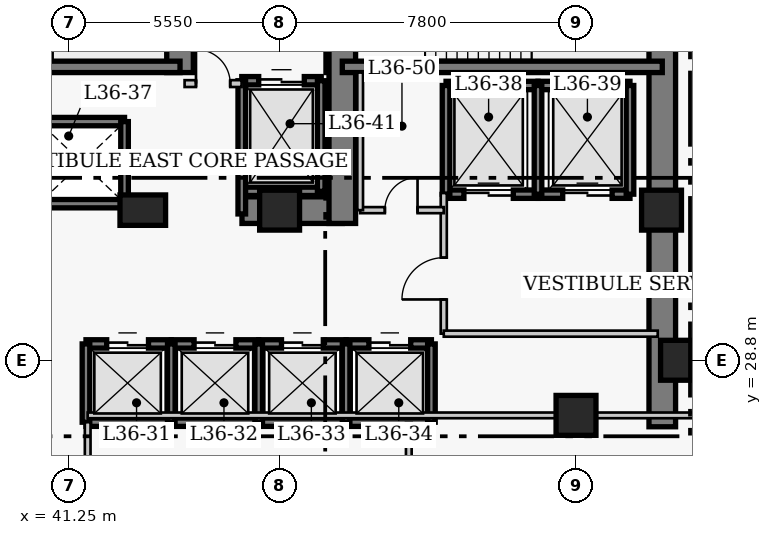
"""IFC4 building model, lengths in metres.
Left out: names, types, materials, properties, quantities, classifications, styles, units other than length and angle.
Written with IfcOpenShell. Run it as: python <this file> out.ifc"""

import sys

from ifc_helpers import new_model, si_unit, direction, frame, frame_2d, origin, origin_2d, place, context, subcontext, project, spatial, rectangle, extrude, element, fill, save


model = new_model("IFC4")
c1 = context("Model", 3, precision=1e-05, world=origin(), true_north=direction((0.0, 1.0)))
c2 = subcontext(c1, "Body", "Model", "MODEL_VIEW")
j1 = project(units=[si_unit("LENGTHUNIT", "METRE"), si_unit("PLANEANGLEUNIT", "RADIAN")], contexts=[c1])
p1 = place(None, origin())
s1 = spatial("IfcSite", under=j1, at=p1, CompositionType="ELEMENT")
p2 = place(p1, origin())
s2 = spatial("IfcBuilding", under=s1, at=p2, CompositionType="ELEMENT")
p3 = place(p2, frame((0.0, 0.0, 146.0)))
s3 = spatial("IfcBuildingStorey", under=s2, at=p3, CompositionType="ELEMENT", Elevation=146.0)
p4 = place(p3, frame((56.87, 27.05, 0.0), z_axis=(0.0, 0.0, 1.0), x_axis=(0.0, 1.0, 0.0)))
e1 = element("IfcWall", 1, at=p4, inside=s3, PredefinedType="SHEAR", context=c2, shape_type="SweptSolid", body=[
    extrude(rectangle(XDim=13.62, YDim=0.7, at=frame_2d((6.81, 0.0))), origin(), (0.0, 0.0, 1.0), 3.8),
])
p5 = place(p3, frame((45.81, 32.75, 0.0), z_axis=(0.0, 0.0, 1.0), x_axis=(1.0, 0.0, 0.0)))
e2 = element("IfcWall", 2, at=p5, inside=s3, PredefinedType="SHEAR", context=c2, shape_type="SweptSolid", body=[
    extrude(rectangle(XDim=2.64, YDim=0.7, at=frame_2d((1.32, 0.0))), origin(), (0.0, 0.0, 1.0), 3.8),
])
p6 = place(p3, frame((44.18, 36.37, 0.0), z_axis=(0.0, 0.0, 1.0), x_axis=(0.0, 1.0, 0.0)))
e3 = element("IfcWall", 3, at=p6, inside=s3, PredefinedType="SHEAR", context=c2, shape_type="SweptSolid", body=[
    extrude(rectangle(XDim=3.95, YDim=0.7, at=frame_2d((1.975, 0.0))), origin(), (0.0, 0.0, 1.0), 3.8),
])
p7 = place(p3, frame((48.45, 32.4, 0.0), z_axis=(0.0, 0.0, 1.0), x_axis=(0.0, 1.0, 0.0)))
e4 = element("IfcWall", 4, at=p7, inside=s3, PredefinedType="SHEAR", context=c2, shape_type="SweptSolid", body=[
    extrude(rectangle(XDim=7.92, YDim=0.7, at=frame_2d((3.96, 0.0))), origin(), (0.0, 0.0, 1.0), 3.8),
])
p8 = place(p7, frame((5.8, 0.0, 0.0)))
e5 = element("IfcOpeningElement", 5, at=p8, cuts=e4, PredefinedType="OPENING", context=c2, shape_type="SweptSolid", body=[
    extrude(rectangle(XDim=1.1, YDim=2.15, at=frame_2d((0.55, 1.075))), frame((0.0, 0.36, 0.0), z_axis=(0.0, -1.0, 0.0), x_axis=(1.0, 0.0, 0.0)), (0.0, 0.0, 1.0), 0.72),
])
p9 = place(p3, frame((35.85, 36.52, 0.0), z_axis=(0.0, 0.0, 1.0), x_axis=(1.0, 0.0, 0.0)))
e6 = element("IfcWall", 6, at=p9, inside=s3, PredefinedType="SHEAR", context=c2, shape_type="SweptSolid", body=[
    extrude(rectangle(XDim=8.33, YDim=0.3, at=frame_2d((4.165, 0.0))), origin(), (0.0, 0.0, 1.0), 3.8),
])
p10 = place(p3, frame((48.45, 36.52, 0.0), z_axis=(0.0, 0.0, 1.0), x_axis=(1.0, 0.0, 0.0)))
e7 = element("IfcWall", 7, at=p10, inside=s3, PredefinedType="SHEAR", context=c2, shape_type="SweptSolid", body=[
    extrude(rectangle(XDim=8.42, YDim=0.3, at=frame_2d((4.21, 0.0))), origin(), (0.0, 0.0, 1.0), 3.8),
])
p11 = place(p3, frame((57.35, 28.8, 0.0), z_axis=(0.0, 0.0, 1.0), x_axis=(1.0, 0.0, 0.0)))
e8 = element("IfcColumn", 8, at=p11, inside=s3, PredefinedType="COLUMN", context=c2, shape_type="SweptSolid", body=[
    extrude(rectangle(XDim=1.05, YDim=1.05, at=origin_2d()), origin(), (0.0, 0.0, 1.0), 3.8),
])
p12 = place(p3, frame((43.2, 32.75, 0.0), z_axis=(0.0, 0.0, 1.0), x_axis=(1.0, 0.0, 0.0)))
e9 = element("IfcColumn", 9, at=p12, inside=s3, PredefinedType="COLUMN", context=c2, shape_type="SweptSolid", body=[
    extrude(rectangle(XDim=1.2, YDim=0.8, at=origin_2d()), origin(), (0.0, 0.0, 1.0), 3.8),
])
for number, where, z_axis, x_axis in (
    (10, (46.8, 32.75, 0.0), (0.0, 0.0, 1.0), (1.0, 0.0, 0.0)),
    (11, (54.6, 27.35, 0.0), (0.0, 0.0, 1.0), (1.0, 0.0, 0.0)),
    (12, (56.85, 32.75, 0.0), (0.0, 0.0, 1.0), (1.0, 0.0, 0.0)),
):
    element("IfcColumn", number, at=place(p3, frame(where, z_axis=z_axis, x_axis=x_axis)), inside=s3, PredefinedType="COLUMN", context=c2, shape_type="SweptSolid", body=[
        extrude(rectangle(XDim=1.05, YDim=1.05, at=origin_2d()), origin(), (0.0, 0.0, 1.0), 3.8),
    ])
p13 = place(p3, frame((41.705, 29.23, 0.0), z_axis=(0.0, 0.0, 1.0), x_axis=(1.0, 0.0, 0.0)))
e13 = element("IfcWall", 13, at=p13, inside=s3, PredefinedType="SHEAR", context=c2, shape_type="SweptSolid", body=[
    extrude(rectangle(XDim=2.245, YDim=0.22, at=frame_2d((1.123, 0.0))), origin(), (0.0, 0.0, 1.0), 3.8),
])
p14 = place(p13, frame((0.545, 0.0, 0.0)))
e14 = element("IfcOpeningElement", 14, at=p14, cuts=e13, PredefinedType="OPENING", context=c2, shape_type="SweptSolid", body=[
    extrude(rectangle(XDim=1.1, YDim=2.15, at=frame_2d((0.55, 1.075))), frame((0.0, 0.12, 0.0), z_axis=(0.0, -1.0, 0.0), x_axis=(1.0, 0.0, 0.0)), (0.0, 0.0, 1.0), 0.24),
])
p15 = place(p3, frame((41.705, 27.17, 0.0), z_axis=(0.0, 0.0, 1.0), x_axis=(1.0, 0.0, 0.0)))
e15 = element("IfcWall", 15, at=p15, inside=s3, PredefinedType="SHEAR", context=c2, shape_type="SweptSolid", body=[
    extrude(rectangle(XDim=2.245, YDim=0.22, at=frame_2d((1.123, 0.0))), origin(), (0.0, 0.0, 1.0), 3.8),
])
p16 = place(p3, frame((41.705, 27.17, 0.0), z_axis=(0.0, 0.0, 1.0), x_axis=(0.0, 1.0, 0.0)))
e16 = element("IfcWall", 16, at=p16, inside=s3, PredefinedType="SHEAR", context=c2, shape_type="SweptSolid", body=[
    extrude(rectangle(XDim=2.06, YDim=0.2, at=frame_2d((1.03, 0.0))), origin(), (0.0, 0.0, 1.0), 3.8),
])
p17 = place(p3, frame((43.95, 29.23, 0.0), z_axis=(0.0, 0.0, 1.0), x_axis=(1.0, 0.0, 0.0)))
e17 = element("IfcWall", 17, at=p17, inside=s3, PredefinedType="SHEAR", context=c2, shape_type="SweptSolid", body=[
    extrude(rectangle(XDim=2.3, YDim=0.22, at=frame_2d((1.15, 0.0))), origin(), (0.0, 0.0, 1.0), 3.8),
])
p18 = place(p17, frame((0.6, 0.0, 0.0)))
e18 = element("IfcOpeningElement", 18, at=p18, cuts=e17, PredefinedType="OPENING", context=c2, shape_type="SweptSolid", body=[
    extrude(rectangle(XDim=1.1, YDim=2.15, at=frame_2d((0.55, 1.075))), frame((0.0, 0.12, 0.0), z_axis=(0.0, -1.0, 0.0), x_axis=(1.0, 0.0, 0.0)), (0.0, 0.0, 1.0), 0.24),
])
p19 = place(p3, frame((43.95, 27.17, 0.0), z_axis=(0.0, 0.0, 1.0), x_axis=(1.0, 0.0, 0.0)))
e19 = element("IfcWall", 19, at=p19, inside=s3, PredefinedType="SHEAR", context=c2, shape_type="SweptSolid", body=[
    extrude(rectangle(XDim=2.3, YDim=0.22, at=frame_2d((1.15, 0.0))), origin(), (0.0, 0.0, 1.0), 3.8),
])
p20 = place(p3, frame((43.95, 27.17, 0.0), z_axis=(0.0, 0.0, 1.0), x_axis=(0.0, 1.0, 0.0)))
e20 = element("IfcWall", 20, at=p20, inside=s3, PredefinedType="SHEAR", context=c2, shape_type="SweptSolid", body=[
    extrude(rectangle(XDim=2.06, YDim=0.2, at=frame_2d((1.03, 0.0))), origin(), (0.0, 0.0, 1.0), 3.8),
])
p21 = place(p3, frame((46.25, 29.23, 0.0), z_axis=(0.0, 0.0, 1.0), x_axis=(1.0, 0.0, 0.0)))
e21 = element("IfcWall", 21, at=p21, inside=s3, PredefinedType="SHEAR", context=c2, shape_type="SweptSolid", body=[
    extrude(rectangle(XDim=2.3, YDim=0.22, at=frame_2d((1.15, 0.0))), origin(), (0.0, 0.0, 1.0), 3.8),
])
p22 = place(p21, frame((0.6, 0.0, 0.0)))
e22 = element("IfcOpeningElement", 22, at=p22, cuts=e21, PredefinedType="OPENING", context=c2, shape_type="SweptSolid", body=[
    extrude(rectangle(XDim=1.1, YDim=2.15, at=frame_2d((0.55, 1.075))), frame((0.0, 0.12, 0.0), z_axis=(0.0, -1.0, 0.0), x_axis=(1.0, 0.0, 0.0)), (0.0, 0.0, 1.0), 0.24),
])
p23 = place(p3, frame((46.25, 27.17, 0.0), z_axis=(0.0, 0.0, 1.0), x_axis=(1.0, 0.0, 0.0)))
e23 = element("IfcWall", 23, at=p23, inside=s3, PredefinedType="SHEAR", context=c2, shape_type="SweptSolid", body=[
    extrude(rectangle(XDim=2.3, YDim=0.22, at=frame_2d((1.15, 0.0))), origin(), (0.0, 0.0, 1.0), 3.8),
])
p24 = place(p3, frame((46.25, 27.17, 0.0), z_axis=(0.0, 0.0, 1.0), x_axis=(0.0, 1.0, 0.0)))
e24 = element("IfcWall", 24, at=p24, inside=s3, PredefinedType="SHEAR", context=c2, shape_type="SweptSolid", body=[
    extrude(rectangle(XDim=2.06, YDim=0.2, at=frame_2d((1.03, 0.0))), origin(), (0.0, 0.0, 1.0), 3.8),
])
p25 = place(p3, frame((48.55, 29.23, 0.0), z_axis=(0.0, 0.0, 1.0), x_axis=(1.0, 0.0, 0.0)))
e25 = element("IfcWall", 25, at=p25, inside=s3, PredefinedType="SHEAR", context=c2, shape_type="SweptSolid", body=[
    extrude(rectangle(XDim=2.245, YDim=0.22, at=frame_2d((1.123, 0.0))), origin(), (0.0, 0.0, 1.0), 3.8),
])
p26 = place(p25, frame((0.6, 0.0, 0.0)))
e26 = element("IfcOpeningElement", 26, at=p26, cuts=e25, PredefinedType="OPENING", context=c2, shape_type="SweptSolid", body=[
    extrude(rectangle(XDim=1.1, YDim=2.15, at=frame_2d((0.55, 1.075))), frame((0.0, 0.12, 0.0), z_axis=(0.0, -1.0, 0.0), x_axis=(1.0, 0.0, 0.0)), (0.0, 0.0, 1.0), 0.24),
])
p27 = place(p3, frame((48.55, 27.17, 0.0), z_axis=(0.0, 0.0, 1.0), x_axis=(1.0, 0.0, 0.0)))
e27 = element("IfcWall", 27, at=p27, inside=s3, PredefinedType="SHEAR", context=c2, shape_type="SweptSolid", body=[
    extrude(rectangle(XDim=2.245, YDim=0.22, at=frame_2d((1.123, 0.0))), origin(), (0.0, 0.0, 1.0), 3.8),
])
for number, where, z_axis, x_axis in (
    (28, (48.55, 27.17, 0.0), (0.0, 0.0, 1.0), (0.0, 1.0, 0.0)),
    (29, (50.795, 27.17, 0.0), (0.0, 0.0, 1.0), (0.0, 1.0, 0.0)),
):
    element("IfcWall", number, at=place(p3, frame(where, z_axis=z_axis, x_axis=x_axis)), inside=s3, PredefinedType="SHEAR", context=c2, shape_type="SweptSolid", body=[
        extrude(rectangle(XDim=2.06, YDim=0.2, at=frame_2d((1.03, 0.0))), origin(), (0.0, 0.0, 1.0), 3.8),
    ])
for number, where, z_axis, x_axis in (
    (30, (40.4, 35.08, 0.0), (0.0, 0.0, 1.0), (1.0, 0.0, 0.0)),
    (31, (40.4, 32.92, 0.0), (0.0, 0.0, 1.0), (1.0, 0.0, 0.0)),
):
    element("IfcWall", number, at=place(p3, frame(where, z_axis=z_axis, x_axis=x_axis)), inside=s3, PredefinedType="SHEAR", context=c2, shape_type="SweptSolid", body=[
        extrude(rectangle(XDim=2.32, YDim=0.22, at=frame_2d((1.16, 0.0))), origin(), (0.0, 0.0, 1.0), 3.8),
    ])
p28 = place(p3, frame((42.72, 32.92, 0.0), z_axis=(0.0, 0.0, 1.0), x_axis=(0.0, 1.0, 0.0)))
e32 = element("IfcWall", 32, at=p28, inside=s3, PredefinedType="SHEAR", context=c2, shape_type="SweptSolid", body=[
    extrude(rectangle(XDim=2.16, YDim=0.2, at=frame_2d((1.08, 0.0))), origin(), (0.0, 0.0, 1.0), 3.8),
])
p29 = place(p3, frame((51.18, 36.03, 0.0), z_axis=(0.0, 0.0, 1.0), x_axis=(1.0, 0.0, 0.0)))
e33 = element("IfcWall", 33, at=p29, inside=s3, PredefinedType="SHEAR", context=c2, shape_type="SweptSolid", body=[
    extrude(rectangle(XDim=2.42, YDim=0.22, at=frame_2d((1.21, 0.0))), origin(), (0.0, 0.0, 1.0), 3.8),
])
p30 = place(p3, frame((51.18, 33.17, 0.0), z_axis=(0.0, 0.0, 1.0), x_axis=(1.0, 0.0, 0.0)))
e34 = element("IfcWall", 34, at=p30, inside=s3, PredefinedType="SHEAR", context=c2, shape_type="SweptSolid", body=[
    extrude(rectangle(XDim=2.42, YDim=0.22, at=frame_2d((1.21, 0.0))), origin(), (0.0, 0.0, 1.0), 3.8),
])
p31 = place(p30, frame((0.47, 0.0, 0.0)))
e35 = element("IfcOpeningElement", 35, at=p31, cuts=e34, PredefinedType="OPENING", context=c2, shape_type="SweptSolid", body=[
    extrude(rectangle(XDim=1.3, YDim=2.15, at=frame_2d((0.65, 1.075))), frame((0.0, 0.12, 0.0), z_axis=(0.0, -1.0, 0.0), x_axis=(1.0, 0.0, 0.0)), (0.0, 0.0, 1.0), 0.24),
])
p32 = place(p3, frame((51.18, 33.17, 0.0), z_axis=(0.0, 0.0, 1.0), x_axis=(0.0, 1.0, 0.0)))
e36 = element("IfcWall", 36, at=p32, inside=s3, PredefinedType="SHEAR", context=c2, shape_type="SweptSolid", body=[
    extrude(rectangle(XDim=2.86, YDim=0.2, at=frame_2d((1.43, 0.0))), origin(), (0.0, 0.0, 1.0), 3.8),
])
p33 = place(p3, frame((53.6, 36.03, 0.0), z_axis=(0.0, 0.0, 1.0), x_axis=(1.0, 0.0, 0.0)))
e37 = element("IfcWall", 37, at=p33, inside=s3, PredefinedType="SHEAR", context=c2, shape_type="SweptSolid", body=[
    extrude(rectangle(XDim=2.42, YDim=0.22, at=frame_2d((1.21, 0.0))), origin(), (0.0, 0.0, 1.0), 3.8),
])
p34 = place(p3, frame((53.6, 33.17, 0.0), z_axis=(0.0, 0.0, 1.0), x_axis=(1.0, 0.0, 0.0)))
e38 = element("IfcWall", 38, at=p34, inside=s3, PredefinedType="SHEAR", context=c2, shape_type="SweptSolid", body=[
    extrude(rectangle(XDim=2.42, YDim=0.22, at=frame_2d((1.21, 0.0))), origin(), (0.0, 0.0, 1.0), 3.8),
])
p35 = place(p34, frame((0.65, 0.0, 0.0)))
e39 = element("IfcOpeningElement", 39, at=p35, cuts=e38, PredefinedType="OPENING", context=c2, shape_type="SweptSolid", body=[
    extrude(rectangle(XDim=1.3, YDim=2.15, at=frame_2d((0.65, 1.075))), frame((0.0, 0.12, 0.0), z_axis=(0.0, -1.0, 0.0), x_axis=(1.0, 0.0, 0.0)), (0.0, 0.0, 1.0), 0.24),
])
for number, where, z_axis, x_axis in (
    (40, (53.6, 33.17, 0.0), (0.0, 0.0, 1.0), (0.0, 1.0, 0.0)),
    (41, (56.02, 33.17, 0.0), (0.0, 0.0, 1.0), (0.0, 1.0, 0.0)),
):
    element("IfcWall", number, at=place(p3, frame(where, z_axis=z_axis, x_axis=x_axis)), inside=s3, PredefinedType="SHEAR", context=c2, shape_type="SweptSolid", body=[
        extrude(rectangle(XDim=2.86, YDim=0.2, at=frame_2d((1.43, 0.0))), origin(), (0.0, 0.0, 1.0), 3.8),
    ])
p36 = place(p3, frame((45.805, 36.155, 0.0), z_axis=(0.0, 0.0, 1.0), x_axis=(1.0, 0.0, 0.0)))
e42 = element("IfcWall", 42, at=p36, inside=s3, PredefinedType="SHEAR", context=c2, shape_type="SweptSolid", body=[
    extrude(rectangle(XDim=2.09, YDim=0.22, at=frame_2d((1.045, 0.0))), origin(), (0.0, 0.0, 1.0), 3.8),
])
p37 = place(p36, frame((0.445, 0.0, 0.0)))
e43 = element("IfcOpeningElement", 43, at=p37, cuts=e42, PredefinedType="OPENING", context=c2, shape_type="SweptSolid", body=[
    extrude(rectangle(XDim=1.2, YDim=2.15, at=frame_2d((0.6, 1.075))), frame((0.0, 0.12, 0.0), z_axis=(0.0, -1.0, 0.0), x_axis=(1.0, 0.0, 0.0)), (0.0, 0.0, 1.0), 0.24),
])
p38 = place(p3, frame((45.805, 33.245, 0.0), z_axis=(0.0, 0.0, 1.0), x_axis=(1.0, 0.0, 0.0)))
e44 = element("IfcWall", 44, at=p38, inside=s3, PredefinedType="SHEAR", context=c2, shape_type="SweptSolid", body=[
    extrude(rectangle(XDim=2.09, YDim=0.22, at=frame_2d((1.045, 0.0))), origin(), (0.0, 0.0, 1.0), 3.8),
])
p39 = place(p3, frame((45.805, 32.65, 0.0), z_axis=(0.0, 0.0, 1.0), x_axis=(0.0, 1.0, 0.0)))
e45 = element("IfcWall", 45, at=p39, inside=s3, PredefinedType="SHEAR", context=c2, shape_type="SweptSolid", body=[
    extrude(rectangle(XDim=3.505, YDim=0.2, at=frame_2d((1.752, 0.0))), origin(), (0.0, 0.0, 1.0), 3.8),
])
p40 = place(p3, frame((47.895, 33.245, 0.0), z_axis=(0.0, 0.0, 1.0), x_axis=(0.0, 1.0, 0.0)))
e46 = element("IfcWall", 46, at=p40, inside=s3, PredefinedType="SHEAR", context=c2, shape_type="SweptSolid", body=[
    extrude(rectangle(XDim=2.91, YDim=0.2, at=frame_2d((1.455, 0.0))), origin(), (0.0, 0.0, 1.0), 3.8),
])
p41 = place(p3, frame((44.3, 36.08, 0.0), z_axis=(0.0, 0.0, 1.0), x_axis=(1.0, 0.0, 0.0)))
e47 = element("IfcWall", 47, at=p41, inside=s3, PredefinedType="PARTITIONING", context=c2, shape_type="SweptSolid", body=[
    extrude(rectangle(XDim=1.5, YDim=0.18, at=frame_2d((0.75, 0.0))), origin(), (0.0, 0.0, 1.0), 3.55),
])
p42 = place(p41, frame((0.3, 0.0, 0.0)))
e48 = element("IfcOpeningElement", 48, at=p42, cuts=e47, PredefinedType="OPENING", context=c2, shape_type="SweptSolid", body=[
    extrude(rectangle(XDim=0.9, YDim=2.15, at=frame_2d((0.45, 1.075))), frame((0.0, 0.1, 0.0), z_axis=(0.0, -1.0, 0.0), x_axis=(1.0, 0.0, 0.0)), (0.0, 0.0, 1.0), 0.2),
])
p43 = place(p3, frame((51.12, 29.5, 0.0), z_axis=(0.0, 0.0, 1.0), x_axis=(0.0, 1.0, 0.0)))
e49 = element("IfcWall", 49, at=p43, inside=s3, PredefinedType="PARTITIONING", context=c2, shape_type="SweptSolid", body=[
    extrude(rectangle(XDim=3.7, YDim=0.16, at=frame_2d((1.85, 0.0))), origin(), (0.0, 0.0, 1.0), 3.55),
])
p44 = place(p43, frame((0.9, 0.0, 0.0)))
e50 = element("IfcOpeningElement", 50, at=p44, cuts=e49, PredefinedType="OPENING", context=c2, shape_type="SweptSolid", body=[
    extrude(rectangle(XDim=1.1, YDim=2.15, at=frame_2d((0.55, 1.075))), frame((0.0, 0.09, 0.0), z_axis=(0.0, -1.0, 0.0), x_axis=(1.0, 0.0, 0.0)), (0.0, 0.0, 1.0), 0.18),
])
p45 = place(p3, frame((51.12, 29.5, 0.0), z_axis=(0.0, 0.0, 1.0), x_axis=(1.0, 0.0, 0.0)))
e51 = element("IfcWall", 51, at=p45, inside=s3, PredefinedType="PARTITIONING", context=c2, shape_type="SweptSolid", body=[
    extrude(rectangle(XDim=5.63, YDim=0.16, at=frame_2d((2.815, 0.0))), origin(), (0.0, 0.0, 1.0), 3.55),
])
p46 = place(p3, frame((48.92, 32.75, 0.0), z_axis=(0.0, 0.0, 1.0), x_axis=(1.0, 0.0, 0.0)))
e52 = element("IfcWall", 52, at=p46, inside=s3, PredefinedType="PARTITIONING", context=c2, shape_type="SweptSolid", body=[
    extrude(rectangle(XDim=2.2, YDim=0.16, at=frame_2d((1.1, 0.0))), origin(), (0.0, 0.0, 1.0), 3.55),
])
p47 = place(p46, frame((0.65, 0.0, 0.0)))
e53 = element("IfcOpeningElement", 53, at=p47, cuts=e52, PredefinedType="OPENING", context=c2, shape_type="SweptSolid", body=[
    extrude(rectangle(XDim=0.86, YDim=2.05, at=frame_2d((0.43, 1.025))), frame((0.0, 0.09, 0.0), z_axis=(0.0, -1.0, 0.0), x_axis=(1.0, 0.0, 0.0)), (0.0, 0.0, 1.0), 0.18),
])
p48 = place(p3, frame((48.92, 32.75, 0.0), z_axis=(0.0, 0.0, 1.0), x_axis=(0.0, 1.0, 0.0)))
e54 = element("IfcWall", 54, at=p48, inside=s3, PredefinedType="PARTITIONING", context=c2, shape_type="SweptSolid", body=[
    extrude(rectangle(XDim=3.62, YDim=0.15, at=frame_2d((1.81, 0.0))), origin(), (0.0, 0.0, 1.0), 3.55),
])
p49 = place(p3, frame((41.75, 19.01, 0.0), z_axis=(0.0, 0.0, 1.0), x_axis=(0.0, 1.0, 0.0)))
e55 = element("IfcWall", 55, at=p49, inside=s3, PredefinedType="PARTITIONING", context=c2, shape_type="SweptSolid", body=[
    extrude(rectangle(XDim=8.16, YDim=0.15, at=frame_2d((4.08, 0.0))), origin(), (0.0, 0.0, 1.0), 3.55),
])
p50 = place(p3, frame((50.2, 19.01, 0.0), z_axis=(0.0, 0.0, 1.0), x_axis=(0.0, 1.0, 0.0)))
e56 = element("IfcWall", 56, at=p50, inside=s3, PredefinedType="PARTITIONING", context=c2, shape_type="SweptSolid", body=[
    extrude(rectangle(XDim=8.14, YDim=0.15, at=frame_2d((4.07, 0.0))), origin(), (0.0, 0.0, 1.0), 3.55),
])
p51 = place(p3, frame((41.75, 27.35, 0.0), z_axis=(0.0, 0.0, 1.0), x_axis=(1.0, 0.0, 0.0)))
e57 = element("IfcWall", 57, at=p51, inside=s3, PredefinedType="PARTITIONING", context=c2, shape_type="SweptSolid", body=[
    extrude(rectangle(XDim=17.19, YDim=0.15, at=frame_2d((8.595, 0.0))), origin(), (0.0, 0.0, 1.0), 3.55),
])
p52 = place(p14, origin())
e58 = element("IfcDoor", 58, at=p52, inside=s3, OperationType="DOUBLE_DOOR_SLIDING", PredefinedType="DOOR", context=c2, shape_type="SweptSolid", body=[
    extrude(rectangle(XDim=1.1, YDim=2.15, at=frame_2d((0.55, 1.075))), frame((0.0, 0.025, 0.0), z_axis=(0.0, -1.0, 0.0), x_axis=(1.0, 0.0, 0.0)), (0.0, 0.0, 1.0), 0.05),
])
fill(e14, e58)
p53 = place(p18, origin())
e59 = element("IfcDoor", 59, at=p53, inside=s3, OperationType="DOUBLE_DOOR_SLIDING", PredefinedType="DOOR", context=c2, shape_type="SweptSolid", body=[
    extrude(rectangle(XDim=1.1, YDim=2.15, at=frame_2d((0.55, 1.075))), frame((0.0, 0.025, 0.0), z_axis=(0.0, -1.0, 0.0), x_axis=(1.0, 0.0, 0.0)), (0.0, 0.0, 1.0), 0.05),
])
fill(e18, e59)
p54 = place(p22, origin())
e60 = element("IfcDoor", 60, at=p54, inside=s3, OperationType="DOUBLE_DOOR_SLIDING", PredefinedType="DOOR", context=c2, shape_type="SweptSolid", body=[
    extrude(rectangle(XDim=1.1, YDim=2.15, at=frame_2d((0.55, 1.075))), frame((0.0, 0.025, 0.0), z_axis=(0.0, -1.0, 0.0), x_axis=(1.0, 0.0, 0.0)), (0.0, 0.0, 1.0), 0.05),
])
fill(e22, e60)
p55 = place(p26, origin())
e61 = element("IfcDoor", 61, at=p55, inside=s3, OperationType="DOUBLE_DOOR_SLIDING", PredefinedType="DOOR", context=c2, shape_type="SweptSolid", body=[
    extrude(rectangle(XDim=1.1, YDim=2.15, at=frame_2d((0.55, 1.075))), frame((0.0, 0.025, 0.0), z_axis=(0.0, -1.0, 0.0), x_axis=(1.0, 0.0, 0.0)), (0.0, 0.0, 1.0), 0.05),
])
fill(e26, e61)
p56 = place(p31, origin())
e62 = element("IfcDoor", 62, at=p56, inside=s3, OperationType="DOUBLE_DOOR_SLIDING", PredefinedType="DOOR", context=c2, shape_type="SweptSolid", body=[
    extrude(rectangle(XDim=1.3, YDim=2.15, at=frame_2d((0.65, 1.075))), frame((0.0, 0.025, 0.0), z_axis=(0.0, -1.0, 0.0), x_axis=(1.0, 0.0, 0.0)), (0.0, 0.0, 1.0), 0.05),
])
fill(e35, e62)
p57 = place(p35, origin())
e63 = element("IfcDoor", 63, at=p57, inside=s3, OperationType="DOUBLE_DOOR_SLIDING", PredefinedType="DOOR", context=c2, shape_type="SweptSolid", body=[
    extrude(rectangle(XDim=1.3, YDim=2.15, at=frame_2d((0.65, 1.075))), frame((0.0, 0.025, 0.0), z_axis=(0.0, -1.0, 0.0), x_axis=(1.0, 0.0, 0.0)), (0.0, 0.0, 1.0), 0.05),
])
fill(e39, e63)
p58 = place(p37, origin())
e64 = element("IfcDoor", 64, at=p58, inside=s3, OperationType="DOUBLE_DOOR_SLIDING", PredefinedType="DOOR", context=c2, shape_type="SweptSolid", body=[
    extrude(rectangle(XDim=1.2, YDim=2.15, at=frame_2d((0.6, 1.075))), frame((0.0, 0.025, 0.0), z_axis=(0.0, -1.0, 0.0), x_axis=(1.0, 0.0, 0.0)), (0.0, 0.0, 1.0), 0.05),
])
fill(e43, e64)
p59 = place(p42, origin())
e65 = element("IfcDoor", 65, at=p59, inside=s3, OperationType="SINGLE_SWING_LEFT", PredefinedType="DOOR", context=c2, shape_type="SweptSolid", body=[
    extrude(rectangle(XDim=0.9, YDim=2.15, at=frame_2d((0.45, 1.075))), frame((0.0, 0.025, 0.0), z_axis=(0.0, -1.0, 0.0), x_axis=(1.0, 0.0, 0.0)), (0.0, 0.0, 1.0), 0.05),
])
fill(e48, e65)
p60 = place(p44, origin())
e66 = element("IfcDoor", 66, at=p60, inside=s3, OperationType="SINGLE_SWING_LEFT", PredefinedType="DOOR", context=c2, shape_type="SweptSolid", body=[
    extrude(rectangle(XDim=1.1, YDim=2.15, at=frame_2d((0.55, 1.075))), frame((0.0, 0.025, 0.0), z_axis=(0.0, -1.0, 0.0), x_axis=(1.0, 0.0, 0.0)), (0.0, 0.0, 1.0), 0.05),
])
fill(e50, e66)
p61 = place(p47, origin())
e67 = element("IfcDoor", 67, at=p61, inside=s3, OperationType="SINGLE_SWING_RIGHT", PredefinedType="DOOR", context=c2, shape_type="SweptSolid", body=[
    extrude(rectangle(XDim=0.86, YDim=2.05, at=frame_2d((0.43, 1.025))), frame((0.0, 0.025, 0.0), z_axis=(0.0, -1.0, 0.0), x_axis=(1.0, 0.0, 0.0)), (0.0, 0.0, 1.0), 0.05),
])
fill(e53, e67)
save(model, sys.argv[1])
